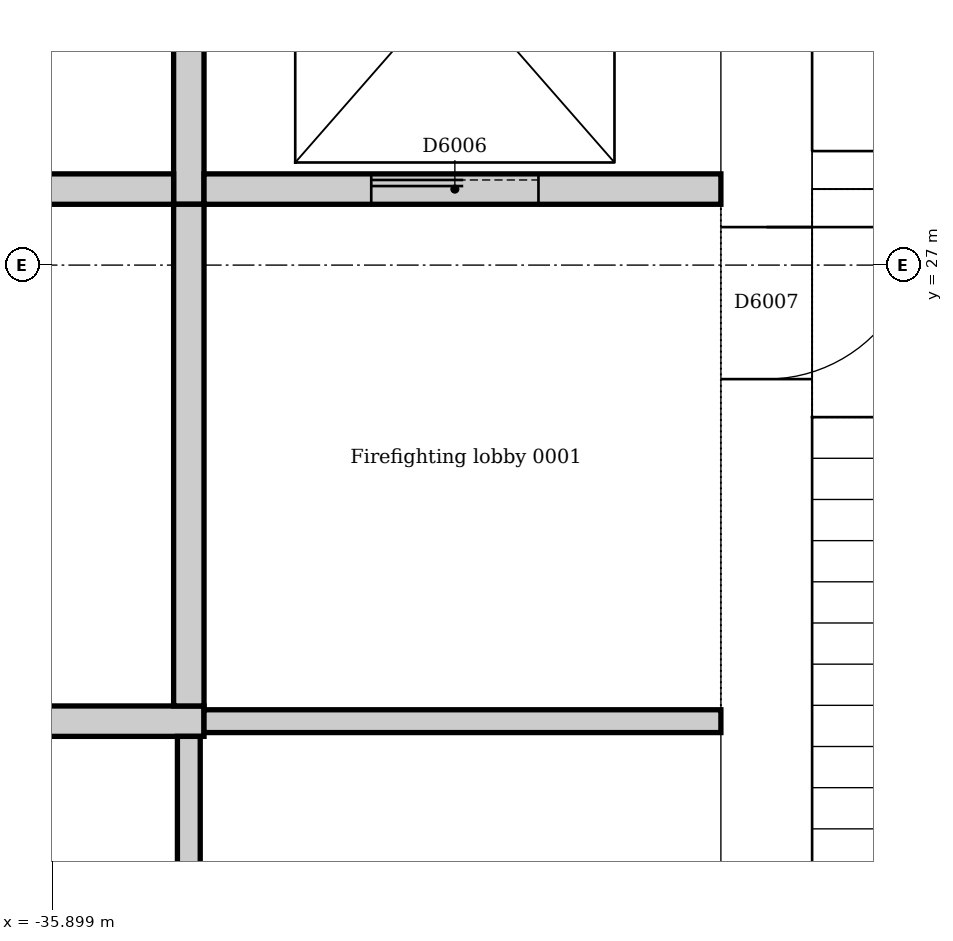
"""IFC4 building model, lengths in metres.
Left out: names, types, materials, properties, quantities, classifications, styles, units other than length and angle.
Written with IfcOpenShell. Run it as: python <this file> out.ifc"""

import sys

from ifc_helpers import new_model, si_unit, direction, frame, frame_2d, origin, place, context, subcontext, project, spatial, rectangle, extrude, element, fill, save


model = new_model("IFC4")
c1 = context("Model", 3, precision=1e-05, world=origin(), true_north=direction((0.0, 1.0)))
c2 = subcontext(c1, "Body", "Model", "MODEL_VIEW")
j1 = project(units=[si_unit("LENGTHUNIT", "METRE"), si_unit("PLANEANGLEUNIT", "RADIAN")], contexts=[c1])
p1 = place(None, origin())
s1 = spatial("IfcSite", under=j1, at=p1, CompositionType="ELEMENT")
p2 = place(p1, origin())
s2 = spatial("IfcBuilding", under=s1, at=p2, CompositionType="ELEMENT")
p3 = place(p2, frame((0.0, 0.0, -9.5)))
s3 = spatial("IfcBuildingStorey", under=s2, at=p3, CompositionType="ELEMENT", Elevation=-9.5)
p4 = place(p3, frame((-31.2, 21.0, 0.0), z_axis=(0.0, 0.0, 1.0), x_axis=(0.0, 1.0, 0.0)))
e1 = element("IfcWall", 1, at=p4, inside=s3, PredefinedType="SOLIDWALL", context=c2, shape_type="SweptSolid", body=[
    extrude(rectangle(XDim=9.5, YDim=0.6, at=frame_2d((4.75, 0.0))), origin(), (0.0, 0.0, 1.0), 4.5),
])
p5 = place(p4, frame((5.25, 0.0, 0.0)))
e2 = element("IfcOpeningElement", 2, at=p5, cuts=e1, PredefinedType="OPENING", context=c2, shape_type="SweptSolid", body=[
    extrude(rectangle(XDim=1.0, YDim=2.1, at=frame_2d((0.5, 1.05))), frame((0.0, 0.31, 0.0), z_axis=(0.0, -1.0, 0.0), x_axis=(1.0, 0.0, 0.0)), (0.0, 0.0, 1.0), 0.62),
])
p6 = place(p3, frame((-27.36, 27.625, 0.0), z_axis=(0.0, 0.0, 1.0), x_axis=(-1.0, 0.0, 0.0)))
e3 = element("IfcWall", 3, at=p6, inside=s3, PredefinedType="SOLIDWALL", context=c2, shape_type="SweptSolid", body=[
    extrude(rectangle(XDim=3.54, YDim=0.25, at=frame_2d((1.77, 0.0))), origin(), (0.0, 0.0, 1.0), 4.5),
])
p7 = place(p6, frame((1.69, 0.0, 0.0)))
e4 = element("IfcOpeningElement", 4, at=p7, cuts=e3, PredefinedType="OPENING", context=c2, shape_type="SweptSolid", body=[
    extrude(rectangle(XDim=1.1, YDim=2.1, at=frame_2d((0.55, 1.05))), frame((0.0, 0.135, 0.0), z_axis=(0.0, -1.0, 0.0), x_axis=(1.0, 0.0, 0.0)), (0.0, 0.0, 1.0), 0.27),
])
p8 = place(p3, frame((-34.9, 24.0, 0.0), z_axis=(0.0, 0.0, 1.0), x_axis=(-1.0, 0.0, 0.0)))
e5 = element("IfcWall", 5, at=p8, inside=s3, PredefinedType="SOLIDWALL", context=c2, shape_type="SweptSolid", body=[
    extrude(rectangle(XDim=3.5, YDim=0.2, at=frame_2d((1.75, 0.0))), origin(), (0.0, 0.0, 1.0), 4.5),
])
p9 = place(p3, frame((-35.0, 27.4, 0.0), z_axis=(0.0, 0.0, 1.0), x_axis=(0.0, 1.0, 0.0)))
e6 = element("IfcWall", 6, at=p9, inside=s3, PredefinedType="SOLIDWALL", context=c2, shape_type="SweptSolid", body=[
    extrude(rectangle(XDim=2.85, YDim=0.2, at=frame_2d((1.425, 0.0))), origin(), (0.0, 0.0, 1.0), 4.5),
])
p10 = place(p3, frame((-38.4, 27.5, 0.0), z_axis=(0.0, 0.0, 1.0), x_axis=(1.0, 0.0, 0.0)))
e7 = element("IfcWall", 7, at=p10, inside=s3, PredefinedType="SOLIDWALL", context=c2, shape_type="SweptSolid", body=[
    extrude(rectangle(XDim=3.3, YDim=0.2, at=frame_2d((1.65, 0.0))), origin(), (0.0, 0.0, 1.0), 4.5),
])
p11 = place(p3, frame((-34.9, 27.5, 0.0), z_axis=(0.0, 0.0, 1.0), x_axis=(1.0, 0.0, 0.0)))
e8 = element("IfcWall", 8, at=p11, inside=s3, PredefinedType="SOLIDWALL", context=c2, shape_type="SweptSolid", body=[
    extrude(rectangle(XDim=3.4, YDim=0.2, at=frame_2d((1.7, 0.0))), origin(), (0.0, 0.0, 1.0), 4.5),
])
p12 = place(p11, frame((1.1, 0.0, 0.0)))
e9 = element("IfcOpeningElement", 9, at=p12, cuts=e8, PredefinedType="OPENING", context=c2, shape_type="SweptSolid", body=[
    extrude(rectangle(XDim=1.1, YDim=2.1, at=frame_2d((0.55, 1.05))), frame((0.0, 0.11, 0.0), z_axis=(0.0, -1.0, 0.0), x_axis=(1.0, 0.0, 0.0)), (0.0, 0.0, 1.0), 0.22),
])
p13 = place(p3, frame((-35.0, 24.1, 0.0), z_axis=(0.0, 0.0, 1.0), x_axis=(0.0, 1.0, 0.0)))
e10 = element("IfcWall", 10, at=p13, inside=s3, PredefinedType="SOLIDWALL", context=c2, shape_type="SweptSolid", body=[
    extrude(rectangle(XDim=3.3, YDim=0.2, at=frame_2d((1.65, 0.0))), origin(), (0.0, 0.0, 1.0), 4.5),
])
p14 = place(p3, frame((-35.0, 21.0, 0.0), z_axis=(0.0, 0.0, 1.0), x_axis=(0.0, 1.0, 0.0)))
e11 = element("IfcWall", 11, at=p14, inside=s3, PredefinedType="SOLIDWALL", context=c2, shape_type="SweptSolid", body=[
    extrude(rectangle(XDim=2.9, YDim=0.15, at=frame_2d((1.45, 0.0))), origin(), (0.0, 0.0, 1.0), 4.5),
])
p15 = place(p3, frame((-31.5, 24.0, 0.0), z_axis=(0.0, 0.0, 1.0), x_axis=(-1.0, 0.0, 0.0)))
e12 = element("IfcWall", 12, at=p15, inside=s3, PredefinedType="SOLIDWALL", context=c2, shape_type="SweptSolid", body=[
    extrude(rectangle(XDim=3.4, YDim=0.15, at=frame_2d((1.7, 0.0))), origin(), (0.0, 0.0, 1.0), 4.5),
])
p16 = place(p12, origin())
e13 = element("IfcDoor", 13, at=p16, inside=s3, OperationType="SLIDING_TO_LEFT", PredefinedType="DOOR", context=c2, shape_type="SweptSolid", body=[
    extrude(rectangle(XDim=1.1, YDim=2.1, at=frame_2d((0.55, 1.05))), frame((0.0, 0.025, 0.0), z_axis=(0.0, -1.0, 0.0), x_axis=(1.0, 0.0, 0.0)), (0.0, 0.0, 1.0), 0.05),
])
fill(e9, e13)
p17 = place(p5, frame((1.0, 0.0, 0.0), z_axis=(0.0, 0.0, 1.0), x_axis=(-1.0, 0.0, 0.0)))
e14 = element("IfcDoor", 14, at=p17, inside=s3, OperationType="SINGLE_SWING_LEFT", PredefinedType="DOOR", context=c2, shape_type="SweptSolid", body=[
    extrude(rectangle(XDim=1.0, YDim=2.1, at=frame_2d((0.5, 1.05))), frame((0.0, 0.025, 0.0), z_axis=(0.0, -1.0, 0.0), x_axis=(1.0, 0.0, 0.0)), (0.0, 0.0, 1.0), 0.05),
])
fill(e2, e14)
save(model, sys.argv[1])
